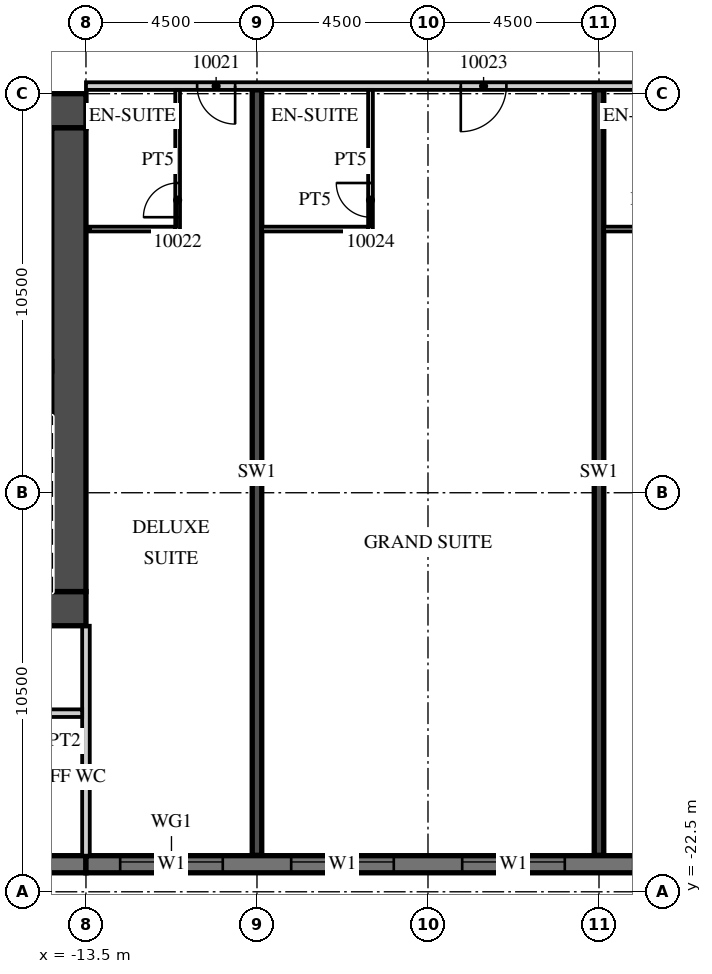
"""IFC4 building model, lengths in metres.
Left out: names, types, materials, properties, quantities, classifications, styles, units other than length and angle.
Written with IfcOpenShell. Run it as: python <this file> out.ifc"""

import sys

from ifc_helpers import new_model, si_unit, direction, frame, frame_2d, origin, place, context, subcontext, project, spatial, rectangle, extrude, element, fill, save


model = new_model("IFC4")
c1 = context("Model", 3, precision=1e-05, world=origin(), true_north=direction((0.0, 1.0)))
c2 = subcontext(c1, "Body", "Model", "MODEL_VIEW")
j1 = project(units=[si_unit("LENGTHUNIT", "METRE"), si_unit("PLANEANGLEUNIT", "RADIAN")], contexts=[c1])
p1 = place(None, origin())
s1 = spatial("IfcSite", under=j1, at=p1, CompositionType="ELEMENT")
p2 = place(p1, origin())
s2 = spatial("IfcBuilding", under=s1, at=p2, CompositionType="ELEMENT")
p3 = place(p2, frame((0.0, 0.0, 63.3)))
s3 = spatial("IfcBuildingStorey", under=s2, at=p3, CompositionType="ELEMENT", Elevation=63.3)
for number, where, z_axis, x_axis in (
    (1, (-9.0, -21.54, 0.0), (0.0, 0.0, 1.0), (0.0, 1.0, 0.0)),
    (2, (0.0, -21.54, 0.0), (0.0, 0.0, 1.0), (0.0, 1.0, 0.0)),
):
    element("IfcWall", number, at=place(p3, frame(where, z_axis=z_axis, x_axis=x_axis)), inside=s3, PredefinedType="SHEAR", context=c2, shape_type="SweptSolid", body=[
        extrude(rectangle(XDim=20.14, YDim=0.25, at=frame_2d((10.07, 0.0))), origin(), (0.0, 0.0, 1.0), 3.3),
    ])
p4 = place(p3, frame((-31.5, -21.775, 0.0), z_axis=(0.0, 0.0, 1.0), x_axis=(1.0, 0.0, 0.0)))
e3 = element("IfcWall", 3, at=p4, inside=s3, PredefinedType="SOLIDWALL", context=c2, shape_type="SweptSolid", body=[
    extrude(rectangle(XDim=18.0, YDim=0.45, at=frame_2d((9.0, 0.0))), origin(), (0.0, 0.0, 1.0), 3.02),
])
p5 = place(p3, frame((-13.5, -21.775, 0.0), z_axis=(0.0, 0.0, 1.0), x_axis=(1.0, 0.0, 0.0)))
e4 = element("IfcWall", 4, at=p5, inside=s3, PredefinedType="SOLIDWALL", context=c2, shape_type="SweptSolid", body=[
    extrude(rectangle(XDim=54.5, YDim=0.45, at=frame_2d((27.25, 0.0))), origin(), (0.0, 0.0, 1.0), 3.02),
])
p6 = place(p5, frame((0.9, 0.0, 0.45)))
e5 = element("IfcOpeningElement", 5, at=p6, cuts=e4, PredefinedType="OPENING", context=c2, shape_type="SweptSolid", body=[
    extrude(rectangle(XDim=2.7, YDim=2.25, at=frame_2d((1.35, 1.125))), frame((0.0, 0.235, 0.0), z_axis=(0.0, -1.0, 0.0), x_axis=(1.0, 0.0, 0.0)), (0.0, 0.0, 1.0), 0.47),
])
p7 = place(p5, frame((5.4, 0.0, 0.45)))
e6 = element("IfcOpeningElement", 6, at=p7, cuts=e4, PredefinedType="OPENING", context=c2, shape_type="SweptSolid", body=[
    extrude(rectangle(XDim=2.7, YDim=2.25, at=frame_2d((1.35, 1.125))), frame((0.0, 0.235, 0.0), z_axis=(0.0, -1.0, 0.0), x_axis=(1.0, 0.0, 0.0)), (0.0, 0.0, 1.0), 0.47),
])
p8 = place(p5, frame((9.9, 0.0, 0.45)))
e7 = element("IfcOpeningElement", 7, at=p8, cuts=e4, PredefinedType="OPENING", context=c2, shape_type="SweptSolid", body=[
    extrude(rectangle(XDim=2.7, YDim=2.25, at=frame_2d((1.35, 1.125))), frame((0.0, 0.235, 0.0), z_axis=(0.0, -1.0, 0.0), x_axis=(1.0, 0.0, 0.0)), (0.0, 0.0, 1.0), 0.47),
])
p9 = place(p5, frame((14.4, 0.0, 0.45)))
e8 = element("IfcOpeningElement", 8, at=p9, cuts=e4, PredefinedType="OPENING", context=c2, shape_type="SweptSolid", body=[
    extrude(rectangle(XDim=2.7, YDim=2.25, at=frame_2d((1.35, 1.125))), frame((0.0, 0.235, 0.0), z_axis=(0.0, -1.0, 0.0), x_axis=(1.0, 0.0, 0.0)), (0.0, 0.0, 1.0), 0.47),
])
p10 = place(p5, frame((18.9, 0.0, 0.45)))
e9 = element("IfcOpeningElement", 9, at=p10, cuts=e4, PredefinedType="OPENING", context=c2, shape_type="SweptSolid", body=[
    extrude(rectangle(XDim=2.7, YDim=2.25, at=frame_2d((1.35, 1.125))), frame((0.0, 0.235, 0.0), z_axis=(0.0, -1.0, 0.0), x_axis=(1.0, 0.0, 0.0)), (0.0, 0.0, 1.0), 0.47),
])
p11 = place(p5, frame((23.4, 0.0, 0.45)))
e10 = element("IfcOpeningElement", 10, at=p11, cuts=e4, PredefinedType="OPENING", context=c2, shape_type="SweptSolid", body=[
    extrude(rectangle(XDim=2.7, YDim=2.25, at=frame_2d((1.35, 1.125))), frame((0.0, 0.235, 0.0), z_axis=(0.0, -1.0, 0.0), x_axis=(1.0, 0.0, 0.0)), (0.0, 0.0, 1.0), 0.47),
])
p12 = place(p5, frame((27.9, 0.0, 0.45)))
e11 = element("IfcOpeningElement", 11, at=p12, cuts=e4, PredefinedType="OPENING", context=c2, shape_type="SweptSolid", body=[
    extrude(rectangle(XDim=2.7, YDim=2.25, at=frame_2d((1.35, 1.125))), frame((0.0, 0.235, 0.0), z_axis=(0.0, -1.0, 0.0), x_axis=(1.0, 0.0, 0.0)), (0.0, 0.0, 1.0), 0.47),
])
p13 = place(p5, frame((32.4, 0.0, 0.45)))
e12 = element("IfcOpeningElement", 12, at=p13, cuts=e4, PredefinedType="OPENING", context=c2, shape_type="SweptSolid", body=[
    extrude(rectangle(XDim=2.7, YDim=2.25, at=frame_2d((1.35, 1.125))), frame((0.0, 0.235, 0.0), z_axis=(0.0, -1.0, 0.0), x_axis=(1.0, 0.0, 0.0)), (0.0, 0.0, 1.0), 0.47),
])
p14 = place(p5, frame((36.9, 0.0, 0.45)))
e13 = element("IfcOpeningElement", 13, at=p14, cuts=e4, PredefinedType="OPENING", context=c2, shape_type="SweptSolid", body=[
    extrude(rectangle(XDim=2.7, YDim=2.25, at=frame_2d((1.35, 1.125))), frame((0.0, 0.235, 0.0), z_axis=(0.0, -1.0, 0.0), x_axis=(1.0, 0.0, 0.0)), (0.0, 0.0, 1.0), 0.47),
])
p15 = place(p5, frame((41.4, 0.0, 0.45)))
e14 = element("IfcOpeningElement", 14, at=p15, cuts=e4, PredefinedType="OPENING", context=c2, shape_type="SweptSolid", body=[
    extrude(rectangle(XDim=2.7, YDim=2.25, at=frame_2d((1.35, 1.125))), frame((0.0, 0.235, 0.0), z_axis=(0.0, -1.0, 0.0), x_axis=(1.0, 0.0, 0.0)), (0.0, 0.0, 1.0), 0.47),
])
p16 = place(p5, frame((45.9, 0.0, 0.45)))
e15 = element("IfcOpeningElement", 15, at=p16, cuts=e4, PredefinedType="OPENING", context=c2, shape_type="SweptSolid", body=[
    extrude(rectangle(XDim=2.7, YDim=2.25, at=frame_2d((1.35, 1.125))), frame((0.0, 0.235, 0.0), z_axis=(0.0, -1.0, 0.0), x_axis=(1.0, 0.0, 0.0)), (0.0, 0.0, 1.0), 0.47),
])
p17 = place(p5, frame((50.4, 0.0, 0.45)))
e16 = element("IfcOpeningElement", 16, at=p17, cuts=e4, PredefinedType="OPENING", context=c2, shape_type="SweptSolid", body=[
    extrude(rectangle(XDim=2.7, YDim=2.25, at=frame_2d((1.35, 1.125))), frame((0.0, 0.235, 0.0), z_axis=(0.0, -1.0, 0.0), x_axis=(1.0, 0.0, 0.0)), (0.0, 0.0, 1.0), 0.47),
])
p18 = place(p3, frame((-13.5, -21.55, 0.0), z_axis=(0.0, 0.0, 1.0), x_axis=(0.0, 1.0, 0.0)))
e17 = element("IfcWall", 17, at=p18, inside=s3, PredefinedType="PARTITIONING", context=c2, shape_type="SweptSolid", body=[
    extrude(rectangle(XDim=6.05, YDim=0.2, at=frame_2d((3.025, 0.0))), origin(), (0.0, 0.0, 1.0), 3.02),
])
p19 = place(p3, frame((-13.5, -1.3, 0.0), z_axis=(0.0, 0.0, 1.0), x_axis=(1.0, 0.0, 0.0)))
e18 = element("IfcWall", 18, at=p19, inside=s3, PredefinedType="PARTITIONING", context=c2, shape_type="SweptSolid", body=[
    extrude(rectangle(XDim=58.05, YDim=0.2, at=frame_2d((29.025, 0.0))), origin(), (0.0, 0.0, 1.0), 3.02),
])
p20 = place(p19, frame((2.925, 0.0, 0.0)))
e19 = element("IfcOpeningElement", 19, at=p20, cuts=e18, PredefinedType="OPENING", context=c2, shape_type="SweptSolid", body=[
    extrude(rectangle(XDim=1.0, YDim=2.1, at=frame_2d((0.5, 1.05))), frame((0.0, 0.11, 0.0), z_axis=(0.0, -1.0, 0.0), x_axis=(1.0, 0.0, 0.0)), (0.0, 0.0, 1.0), 0.22),
])
p21 = place(p19, frame((9.863, 0.0, 0.0)))
e20 = element("IfcOpeningElement", 20, at=p21, cuts=e18, PredefinedType="OPENING", context=c2, shape_type="SweptSolid", body=[
    extrude(rectangle(XDim=1.2, YDim=2.1, at=frame_2d((0.6, 1.05))), frame((0.0, 0.11, 0.0), z_axis=(0.0, -1.0, 0.0), x_axis=(1.0, 0.0, 0.0)), (0.0, 0.0, 1.0), 0.22),
])
p22 = place(p19, frame((16.45, 0.0, 0.0)))
e21 = element("IfcOpeningElement", 21, at=p22, cuts=e18, PredefinedType="OPENING", context=c2, shape_type="SweptSolid", body=[
    extrude(rectangle(XDim=1.0, YDim=2.1, at=frame_2d((0.5, 1.05))), frame((0.0, 0.11, 0.0), z_axis=(0.0, -1.0, 0.0), x_axis=(1.0, 0.0, 0.0)), (0.0, 0.0, 1.0), 0.22),
])
p23 = place(p19, frame((18.55, 0.0, 0.0)))
e22 = element("IfcOpeningElement", 22, at=p23, cuts=e18, PredefinedType="OPENING", context=c2, shape_type="SweptSolid", body=[
    extrude(rectangle(XDim=1.0, YDim=2.1, at=frame_2d((0.5, 1.05))), frame((0.0, 0.11, 0.0), z_axis=(0.0, -1.0, 0.0), x_axis=(1.0, 0.0, 0.0)), (0.0, 0.0, 1.0), 0.22),
])
p24 = place(p19, frame((24.938, 0.0, 0.0)))
e23 = element("IfcOpeningElement", 23, at=p24, cuts=e18, PredefinedType="OPENING", context=c2, shape_type="SweptSolid", body=[
    extrude(rectangle(XDim=1.2, YDim=2.1, at=frame_2d((0.6, 1.05))), frame((0.0, 0.11, 0.0), z_axis=(0.0, -1.0, 0.0), x_axis=(1.0, 0.0, 0.0)), (0.0, 0.0, 1.0), 0.22),
])
p25 = place(p19, frame((33.938, 0.0, 0.0)))
e24 = element("IfcOpeningElement", 24, at=p25, cuts=e18, PredefinedType="OPENING", context=c2, shape_type="SweptSolid", body=[
    extrude(rectangle(XDim=1.2, YDim=2.1, at=frame_2d((0.6, 1.05))), frame((0.0, 0.11, 0.0), z_axis=(0.0, -1.0, 0.0), x_axis=(1.0, 0.0, 0.0)), (0.0, 0.0, 1.0), 0.22),
])
p26 = place(p19, frame((42.938, 0.0, 0.0)))
e25 = element("IfcOpeningElement", 25, at=p26, cuts=e18, PredefinedType="OPENING", context=c2, shape_type="SweptSolid", body=[
    extrude(rectangle(XDim=1.2, YDim=2.1, at=frame_2d((0.6, 1.05))), frame((0.0, 0.11, 0.0), z_axis=(0.0, -1.0, 0.0), x_axis=(1.0, 0.0, 0.0)), (0.0, 0.0, 1.0), 0.22),
])
p27 = place(p19, frame((52.425, 0.0, 0.0)))
e26 = element("IfcOpeningElement", 26, at=p27, cuts=e18, PredefinedType="OPENING", context=c2, shape_type="SweptSolid", body=[
    extrude(rectangle(XDim=1.0, YDim=2.1, at=frame_2d((0.5, 1.05))), frame((0.0, 0.11, 0.0), z_axis=(0.0, -1.0, 0.0), x_axis=(1.0, 0.0, 0.0)), (0.0, 0.0, 1.0), 0.22),
])
p28 = place(p19, frame((56.525, 0.0, 0.0)))
e27 = element("IfcOpeningElement", 27, at=p28, cuts=e18, PredefinedType="OPENING", context=c2, shape_type="SweptSolid", body=[
    extrude(rectangle(XDim=1.0, YDim=2.1, at=frame_2d((0.5, 1.05))), frame((0.0, 0.11, 0.0), z_axis=(0.0, -1.0, 0.0), x_axis=(1.0, 0.0, 0.0)), (0.0, 0.0, 1.0), 0.22),
])
p29 = place(p3, frame((-11.088, -5.125, 0.0), z_axis=(0.0, 0.0, 1.0), x_axis=(0.0, 1.0, 0.0)))
e28 = element("IfcWall", 28, at=p29, inside=s3, PredefinedType="PARTITIONING", context=c2, shape_type="SweptSolid", body=[
    extrude(rectangle(XDim=3.725, YDim=0.125, at=frame_2d((1.863, 0.0))), origin(), (0.0, 0.0, 1.0), 3.02),
])
p30 = place(p29, frame((0.375, 0.0, 0.0)))
e29 = element("IfcOpeningElement", 29, at=p30, cuts=e28, PredefinedType="OPENING", context=c2, shape_type="SweptSolid", body=[
    extrude(rectangle(XDim=0.9, YDim=2.1, at=frame_2d((0.45, 1.05))), frame((0.0, 0.073, 0.0), z_axis=(0.0, -1.0, 0.0), x_axis=(1.0, 0.0, 0.0)), (0.0, 0.0, 1.0), 0.145),
])
p31 = place(p3, frame((-13.4, -5.062, 0.0), z_axis=(0.0, 0.0, 1.0), x_axis=(1.0, 0.0, 0.0)))
e30 = element("IfcWall", 30, at=p31, inside=s3, PredefinedType="PARTITIONING", context=c2, shape_type="SweptSolid", body=[
    extrude(rectangle(XDim=2.25, YDim=0.125, at=frame_2d((1.125, 0.0))), origin(), (0.0, 0.0, 1.0), 3.02),
])
p32 = place(p3, frame((-6.013, -5.125, 0.0), z_axis=(0.0, 0.0, 1.0), x_axis=(0.0, 1.0, 0.0)))
e31 = element("IfcWall", 31, at=p32, inside=s3, PredefinedType="PARTITIONING", context=c2, shape_type="SweptSolid", body=[
    extrude(rectangle(XDim=3.725, YDim=0.125, at=frame_2d((1.863, 0.0))), origin(), (0.0, 0.0, 1.0), 3.02),
])
p33 = place(p32, frame((0.375, 0.0, 0.0)))
e32 = element("IfcOpeningElement", 32, at=p33, cuts=e31, PredefinedType="OPENING", context=c2, shape_type="SweptSolid", body=[
    extrude(rectangle(XDim=0.9, YDim=2.1, at=frame_2d((0.45, 1.05))), frame((0.0, 0.073, 0.0), z_axis=(0.0, -1.0, 0.0), x_axis=(1.0, 0.0, 0.0)), (0.0, 0.0, 1.0), 0.145),
])
p34 = place(p3, frame((-8.875, -5.062, 0.0), z_axis=(0.0, 0.0, 1.0), x_axis=(1.0, 0.0, 0.0)))
e33 = element("IfcWall", 33, at=p34, inside=s3, PredefinedType="PARTITIONING", context=c2, shape_type="SweptSolid", body=[
    extrude(rectangle(XDim=2.8, YDim=0.125, at=frame_2d((1.4, 0.0))), origin(), (0.0, 0.0, 1.0), 3.02),
])
p35 = place(p3, frame((0.125, -5.062, 0.0), z_axis=(0.0, 0.0, 1.0), x_axis=(1.0, 0.0, 0.0)))
e34 = element("IfcWall", 34, at=p35, inside=s3, PredefinedType="PARTITIONING", context=c2, shape_type="SweptSolid", body=[
    extrude(rectangle(XDim=2.25, YDim=0.125, at=frame_2d((1.125, 0.0))), origin(), (0.0, 0.0, 1.0), 3.02),
])
p36 = place(p3, frame((-31.5, -1.95, 0.0), z_axis=(0.0, 0.0, 1.0), x_axis=(1.0, 0.0, 0.0)))
e35 = element("IfcWall", 35, at=p36, inside=s3, PredefinedType="SHEAR", context=c2, shape_type="SweptSolid", body=[
    extrude(rectangle(XDim=18.0, YDim=0.9, at=frame_2d((9.0, 0.0))), origin(), (0.0, 0.0, 1.0), 3.02),
])
p37 = place(p36, frame((14.725, 0.0, 0.0)))
e36 = element("IfcOpeningElement", 36, at=p37, cuts=e35, PredefinedType="OPENING", context=c2, shape_type="SweptSolid", body=[
    extrude(rectangle(XDim=1.8, YDim=2.1, at=frame_2d((0.9, 1.05))), frame((0.0, 0.46, 0.0), z_axis=(0.0, -1.0, 0.0), x_axis=(1.0, 0.0, 0.0)), (0.0, 0.0, 1.0), 0.92),
])
p38 = place(p3, frame((-20.3, -15.05, 0.0), z_axis=(0.0, 0.0, 1.0), x_axis=(1.0, 0.0, 0.0)))
e37 = element("IfcWall", 37, at=p38, inside=s3, PredefinedType="SHEAR", context=c2, shape_type="SweptSolid", body=[
    extrude(rectangle(XDim=6.8, YDim=0.9, at=frame_2d((3.4, 0.0))), origin(), (0.0, 0.0, 1.0), 3.02),
])
p39 = place(p38, frame((0.875, 0.0, 0.0)))
e38 = element("IfcOpeningElement", 38, at=p39, cuts=e37, PredefinedType="OPENING", context=c2, shape_type="SweptSolid", body=[
    extrude(rectangle(XDim=1.2, YDim=2.1, at=frame_2d((0.6, 1.05))), frame((0.0, 0.46, 0.0), z_axis=(0.0, -1.0, 0.0), x_axis=(1.0, 0.0, 0.0)), (0.0, 0.0, 1.0), 0.92),
])
p40 = place(p3, frame((-13.95, -14.6, 0.0), z_axis=(0.0, 0.0, 1.0), x_axis=(0.0, 1.0, 0.0)))
e39 = element("IfcWall", 39, at=p40, inside=s3, PredefinedType="SHEAR", context=c2, shape_type="SweptSolid", body=[
    extrude(rectangle(XDim=12.2, YDim=0.9, at=frame_2d((6.1, 0.0))), origin(), (0.0, 0.0, 1.0), 3.02),
])
p41 = place(p3, frame((-44.55, -17.8, 0.0), z_axis=(0.0, 0.0, 1.0), x_axis=(1.0, 0.0, 0.0)))
e40 = element("IfcWall", 40, at=p41, inside=s3, PredefinedType="PARTITIONING", context=c2, shape_type="SweptSolid", body=[
    extrude(rectangle(XDim=30.95, YDim=0.2, at=frame_2d((15.475, 0.0))), origin(), (0.0, 0.0, 1.0), 3.02),
])
p42 = place(p41, frame((15.038, 0.0, 0.0)))
e41 = element("IfcOpeningElement", 41, at=p42, cuts=e40, PredefinedType="OPENING", context=c2, shape_type="SweptSolid", body=[
    extrude(rectangle(XDim=0.9, YDim=2.1, at=frame_2d((0.45, 1.05))), frame((0.0, 0.11, 0.0), z_axis=(0.0, -1.0, 0.0), x_axis=(1.0, 0.0, 0.0)), (0.0, 0.0, 1.0), 0.22),
])
p43 = place(p41, frame((23.337, 0.0, 0.0)))
e42 = element("IfcOpeningElement", 42, at=p43, cuts=e40, PredefinedType="OPENING", context=c2, shape_type="SweptSolid", body=[
    extrude(rectangle(XDim=0.9, YDim=2.1, at=frame_2d((0.45, 1.05))), frame((0.0, 0.11, 0.0), z_axis=(0.0, -1.0, 0.0), x_axis=(1.0, 0.0, 0.0)), (0.0, 0.0, 1.0), 0.22),
])
p44 = place(p6, origin())
e43 = element("IfcWindow", 43, at=p44, inside=s3, PartitioningType="SINGLE_PANEL", PredefinedType="WINDOW", context=c2, shape_type="SweptSolid", body=[
    extrude(rectangle(XDim=2.7, YDim=2.25, at=frame_2d((1.35, 1.125))), frame((0.0, 0.09, 0.0), z_axis=(0.0, -1.0, 0.0), x_axis=(1.0, 0.0, 0.0)), (0.0, 0.0, 1.0), 0.06),
])
fill(e5, e43)
p45 = place(p7, origin())
e44 = element("IfcWindow", 44, at=p45, inside=s3, PartitioningType="SINGLE_PANEL", PredefinedType="WINDOW", context=c2, shape_type="SweptSolid", body=[
    extrude(rectangle(XDim=2.7, YDim=2.25, at=frame_2d((1.35, 1.125))), frame((0.0, 0.09, 0.0), z_axis=(0.0, -1.0, 0.0), x_axis=(1.0, 0.0, 0.0)), (0.0, 0.0, 1.0), 0.06),
])
fill(e6, e44)
p46 = place(p8, origin())
e45 = element("IfcWindow", 45, at=p46, inside=s3, PartitioningType="SINGLE_PANEL", PredefinedType="WINDOW", context=c2, shape_type="SweptSolid", body=[
    extrude(rectangle(XDim=2.7, YDim=2.25, at=frame_2d((1.35, 1.125))), frame((0.0, 0.09, 0.0), z_axis=(0.0, -1.0, 0.0), x_axis=(1.0, 0.0, 0.0)), (0.0, 0.0, 1.0), 0.06),
])
fill(e7, e45)
p47 = place(p20, origin())
e46 = element("IfcDoor", 46, at=p47, inside=s3, OperationType="SINGLE_SWING_RIGHT", PredefinedType="DOOR", context=c2, shape_type="SweptSolid", body=[
    extrude(rectangle(XDim=1.0, YDim=2.1, at=frame_2d((0.5, 1.05))), frame((0.0, 0.025, 0.0), z_axis=(0.0, -1.0, 0.0), x_axis=(1.0, 0.0, 0.0)), (0.0, 0.0, 1.0), 0.05),
])
fill(e19, e46)
p48 = place(p30, origin())
e47 = element("IfcDoor", 47, at=p48, inside=s3, OperationType="SINGLE_SWING_LEFT", PredefinedType="DOOR", context=c2, shape_type="SweptSolid", body=[
    extrude(rectangle(XDim=0.9, YDim=2.1, at=frame_2d((0.45, 1.05))), frame((0.0, 0.025, 0.0), z_axis=(0.0, -1.0, 0.0), x_axis=(1.0, 0.0, 0.0)), (0.0, 0.0, 1.0), 0.05),
])
fill(e29, e47)
p49 = place(p21, origin())
e48 = element("IfcDoor", 48, at=p49, inside=s3, OperationType="SINGLE_SWING_LEFT", PredefinedType="DOOR", context=c2, shape_type="SweptSolid", body=[
    extrude(rectangle(XDim=1.2, YDim=2.1, at=frame_2d((0.6, 1.05))), frame((0.0, 0.025, 0.0), z_axis=(0.0, -1.0, 0.0), x_axis=(1.0, 0.0, 0.0)), (0.0, 0.0, 1.0), 0.05),
])
fill(e20, e48)
p50 = place(p33, origin())
e49 = element("IfcDoor", 49, at=p50, inside=s3, OperationType="SINGLE_SWING_RIGHT", PredefinedType="DOOR", context=c2, shape_type="SweptSolid", body=[
    extrude(rectangle(XDim=0.9, YDim=2.1, at=frame_2d((0.45, 1.05))), frame((0.0, 0.025, 0.0), z_axis=(0.0, -1.0, 0.0), x_axis=(1.0, 0.0, 0.0)), (0.0, 0.0, 1.0), 0.05),
])
fill(e32, e49)
save(model, sys.argv[1])
